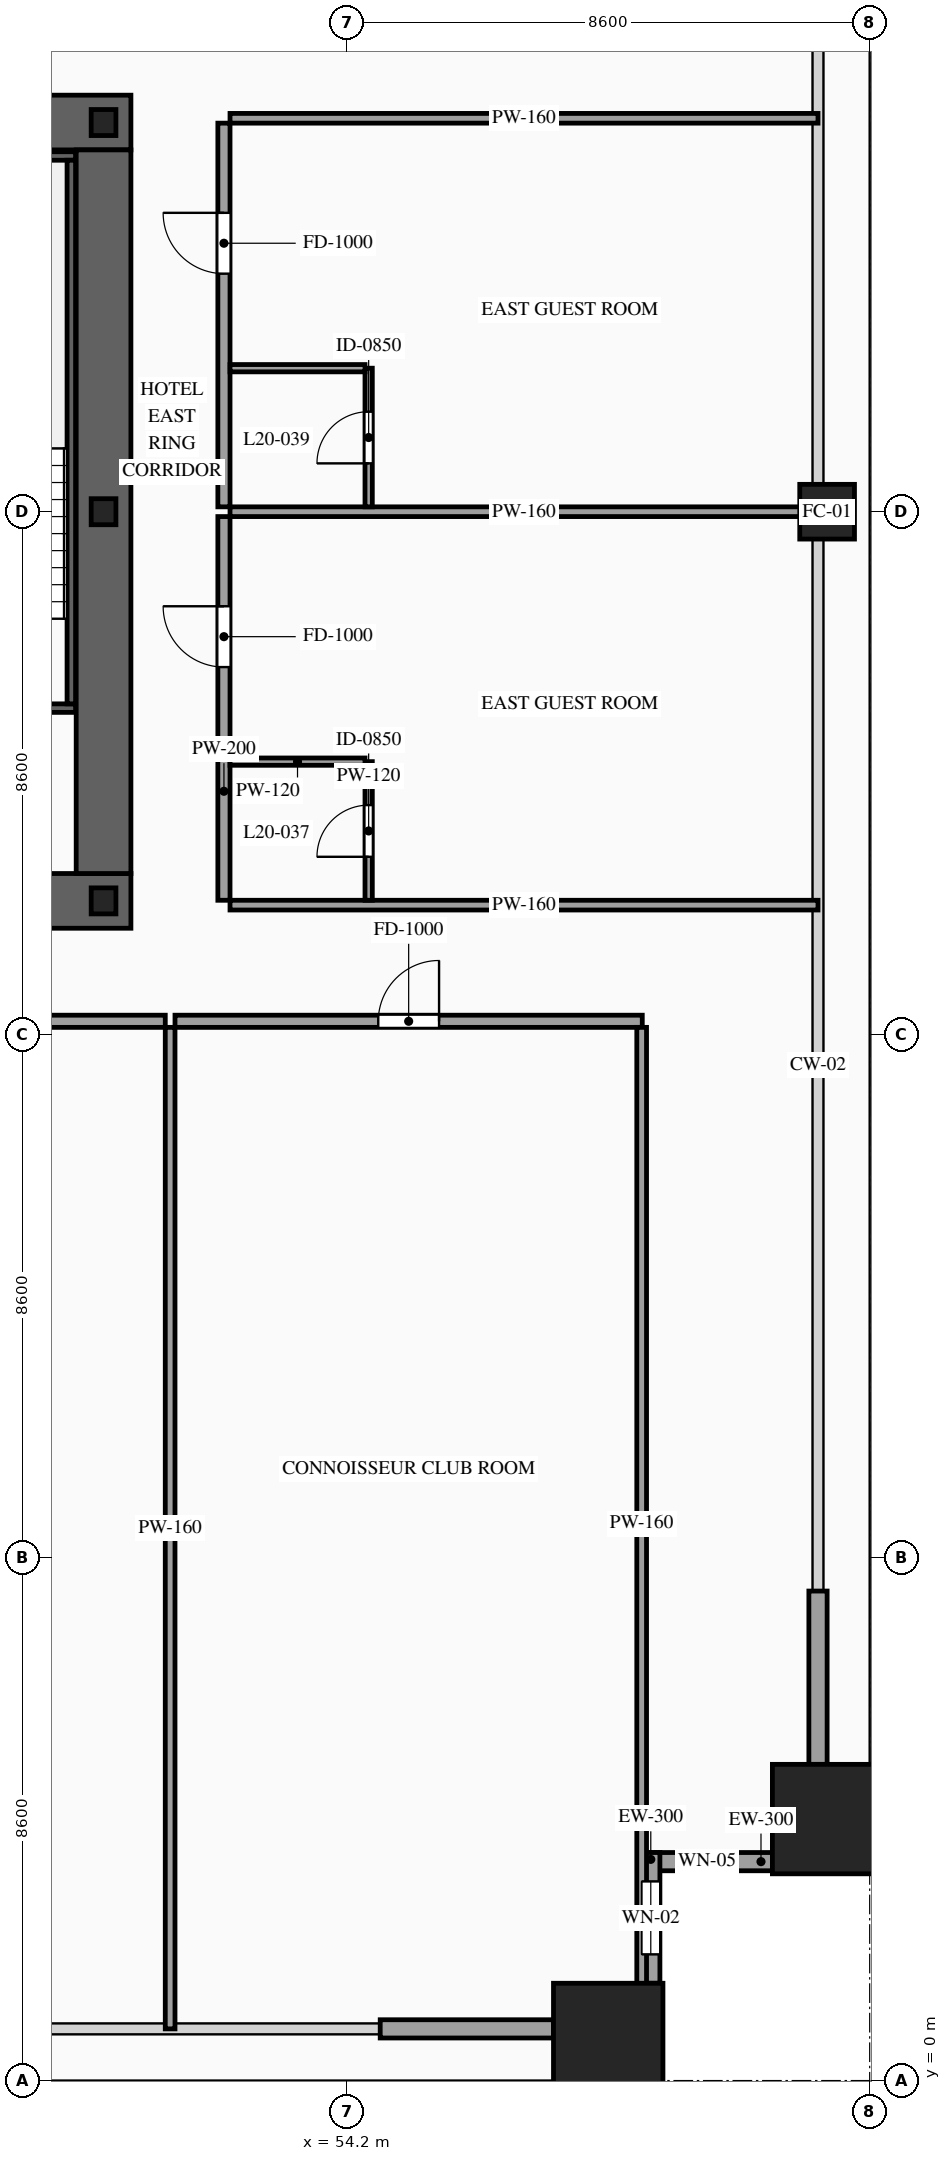
"""IFC4 building model, lengths in metres.
Left out: names, types, materials, properties, quantities, classifications, styles, units other than length and angle.
Written with IfcOpenShell. Run it as: python <this file> out.ifc"""

import sys

from ifc_helpers import new_model, si_unit, direction, frame, frame_2d, origin, origin_2d, place, context, subcontext, project, spatial, rectangle, hollow_rectangle, i_section, extrude, source, transform, mapped, element, fill, save


model = new_model("IFC4")
c1 = context("Model", 3, precision=1e-05, world=origin(), true_north=direction((0.0, 1.0)))
c2 = subcontext(c1, "Body", "Model", "MODEL_VIEW")
j1 = project(units=[si_unit("LENGTHUNIT", "METRE"), si_unit("PLANEANGLEUNIT", "RADIAN")], contexts=[c1])
p1 = place(None, origin())
s1 = spatial("IfcSite", under=j1, at=p1, CompositionType="ELEMENT")
p2 = place(p1, origin())
s2 = spatial("IfcBuilding", under=s1, at=p2, CompositionType="ELEMENT")
p3 = place(p2, frame((0.0, 0.0, 78.4)))
s3 = spatial("IfcBuildingStorey", under=s2, at=p3, CompositionType="ELEMENT", Elevation=78.4)
p4 = place(p3, frame((23.35, 19.4, 0.0), z_axis=(0.0, 0.0, 1.0), x_axis=(1.0, 0.0, 0.0)))
e1 = element("IfcWall", 1, at=p4, inside=s3, PredefinedType="SHEAR", context=c2, shape_type="SweptSolid", body=[
    extrude(rectangle(XDim=27.3, YDim=0.9, at=frame_2d((13.65, 0.0))), origin(), (0.0, 0.0, 1.0), 3.6),
])
p5 = place(p4, frame((2.1, 0.0, 0.0)))
e2 = element("IfcOpeningElement", 2, at=p5, cuts=e1, PredefinedType="OPENING", context=c2, shape_type="SweptSolid", body=[
    extrude(rectangle(XDim=1.1, YDim=2.2, at=frame_2d((0.55, 1.1))), frame((0.0, 0.465, 0.0), z_axis=(0.0, -1.0, 0.0), x_axis=(1.0, 0.0, 0.0)), (0.0, 0.0, 1.0), 0.93),
])
p6 = place(p4, frame((10.0, 0.0, 0.0)))
e3 = element("IfcOpeningElement", 3, at=p6, cuts=e1, PredefinedType="OPENING", context=c2, shape_type="SweptSolid", body=[
    extrude(rectangle(XDim=1.1, YDim=2.2, at=frame_2d((0.55, 1.1))), frame((0.0, 0.465, 0.0), z_axis=(0.0, -1.0, 0.0), x_axis=(1.0, 0.0, 0.0)), (0.0, 0.0, 1.0), 0.93),
])
p7 = place(p4, frame((23.2, 0.0, 0.0)))
e4 = element("IfcOpeningElement", 4, at=p7, cuts=e1, PredefinedType="OPENING", context=c2, shape_type="SweptSolid", body=[
    extrude(rectangle(XDim=1.1, YDim=2.2, at=frame_2d((0.55, 1.1))), frame((0.0, 0.465, 0.0), z_axis=(0.0, -1.0, 0.0), x_axis=(1.0, 0.0, 0.0)), (0.0, 0.0, 1.0), 0.93),
])
p8 = place(p4, frame((19.82, 0.0, 0.0)))
e5 = element("IfcOpeningElement", 5, at=p8, cuts=e1, PredefinedType="OPENING", context=c2, shape_type="SweptSolid", body=[
    extrude(rectangle(XDim=0.9, YDim=2.15, at=frame_2d((0.45, 1.075))), frame((0.0, 0.465, 0.0), z_axis=(0.0, -1.0, 0.0), x_axis=(1.0, 0.0, 0.0)), (0.0, 0.0, 1.0), 0.93),
])
p9 = place(p4, frame((18.38, 0.0, 0.0)))
e6 = element("IfcOpeningElement", 6, at=p9, cuts=e1, PredefinedType="OPENING", context=c2, shape_type="SweptSolid", body=[
    extrude(rectangle(XDim=0.9, YDim=2.15, at=frame_2d((0.45, 1.075))), frame((0.0, 0.465, 0.0), z_axis=(0.0, -1.0, 0.0), x_axis=(1.0, 0.0, 0.0)), (0.0, 0.0, 1.0), 0.93),
])
p10 = place(p3, frame((23.35, 32.2, 0.0), z_axis=(0.0, 0.0, 1.0), x_axis=(1.0, 0.0, 0.0)))
e7 = element("IfcWall", 7, at=p10, inside=s3, PredefinedType="SHEAR", context=c2, shape_type="SweptSolid", body=[
    extrude(rectangle(XDim=27.3, YDim=0.9, at=frame_2d((13.65, 0.0))), origin(), (0.0, 0.0, 1.0), 3.6),
])
p11 = place(p10, frame((4.72, 0.0, 0.0)))
e8 = element("IfcOpeningElement", 8, at=p11, cuts=e7, PredefinedType="OPENING", context=c2, shape_type="SweptSolid", body=[
    extrude(rectangle(XDim=0.9, YDim=2.15, at=frame_2d((0.45, 1.075))), frame((0.0, 0.465, 0.0), z_axis=(0.0, -1.0, 0.0), x_axis=(1.0, 0.0, 0.0)), (0.0, 0.0, 1.0), 0.93),
])
p12 = place(p10, frame((10.0, 0.0, 0.0)))
e9 = element("IfcOpeningElement", 9, at=p12, cuts=e7, PredefinedType="OPENING", context=c2, shape_type="SweptSolid", body=[
    extrude(rectangle(XDim=1.1, YDim=2.2, at=frame_2d((0.55, 1.1))), frame((0.0, 0.465, 0.0), z_axis=(0.0, -1.0, 0.0), x_axis=(1.0, 0.0, 0.0)), (0.0, 0.0, 1.0), 0.93),
])
p13 = place(p10, frame((15.85, 0.0, 0.0)))
e10 = element("IfcOpeningElement", 10, at=p13, cuts=e7, PredefinedType="OPENING", context=c2, shape_type="SweptSolid", body=[
    extrude(rectangle(XDim=1.1, YDim=2.2, at=frame_2d((0.55, 1.1))), frame((0.0, 0.465, 0.0), z_axis=(0.0, -1.0, 0.0), x_axis=(1.0, 0.0, 0.0)), (0.0, 0.0, 1.0), 0.93),
])
m1 = source(origin(), c2, "Body", "SweptSolid", [
    extrude(rectangle(XDim=11.9, YDim=0.9, at=frame_2d((5.95, 0.0))), origin(), (0.0, 0.0, 1.0), 3.6),
])
p14 = place(p3, frame((50.2, 19.85, 0.0), z_axis=(0.0, 0.0, 1.0), x_axis=(0.0, 1.0, 0.0)))
e11 = element("IfcWall", 11, at=p14, inside=s3, PredefinedType="SHEAR", context=c2, shape_type="MappedRepresentation", body=[
    mapped(m1, transform((0.0, 0.0, 0.0), scale=1.0)),
])
m2 = source(origin(), c2, "Body", "SweptSolid", [
    extrude(i_section(OverallWidth=0.407, OverallDepth=0.428, WebThickness=0.02, FlangeThickness=0.035, at=origin_2d()), origin(), (0.0, 0.0, 1.0), 3.6),
])
for number, where, z_axis, x_axis in (
    (12, (50.2, 19.4, 0.0), (0.0, 0.0, 1.0), (1.0, 0.0, 0.0)),
    (13, (50.2, 25.8, 0.0), (0.0, 0.0, 1.0), (1.0, 0.0, 0.0)),
    (14, (50.2, 32.2, 0.0), (0.0, 0.0, 1.0), (1.0, 0.0, 0.0)),
):
    element("IfcColumn", number, at=place(p3, frame(where, z_axis=z_axis, x_axis=x_axis)), inside=s3, PredefinedType="COLUMN", context=c2, shape_type="MappedRepresentation", body=[
        mapped(m2, transform((0.0, 0.0, 0.0), scale=1.0)),
    ])
m3 = source(origin(), c2, "Body", "SweptSolid", [
    extrude(hollow_rectangle(XDim=1.8, YDim=1.8, WallThickness=0.08, at=origin_2d()), origin(), (0.0, 0.0, 1.0), 3.6),
])
for number, where, z_axis, x_axis in (
    (15, (58.5, 0.7, 0.0), (0.0, 0.0, 1.0), (1.0, 0.0, 0.0)),
    (16, (62.1, 4.3, 0.0), (0.0, 0.0, 1.0), (1.0, 0.0, 0.0)),
):
    element("IfcColumn", number, at=place(p3, frame(where, z_axis=z_axis, x_axis=x_axis)), inside=s3, PredefinedType="COLUMN", context=c2, shape_type="MappedRepresentation", body=[
        mapped(m3, transform((0.0, 0.0, 0.0), scale=1.0)),
    ])
m4 = source(origin(), c2, "Body", "SweptSolid", [
    extrude(hollow_rectangle(XDim=0.9, YDim=0.9, WallThickness=0.042, at=origin_2d()), origin(), (0.0, 0.0, 1.0), 3.6),
])
p15 = place(p3, frame((62.1, 25.8, 0.0), z_axis=(0.0, 0.0, 1.0), x_axis=(1.0, 0.0, 0.0)))
e17 = element("IfcColumn", 17, at=p15, inside=s3, PredefinedType="COLUMN", context=c2, shape_type="MappedRepresentation", body=[
    mapped(m4, transform((0.0, 0.0, 0.0), scale=1.0)),
])
p16 = place(p3, frame((59.05, 3.6, 0.0), z_axis=(0.0, 0.0, 1.0), x_axis=(1.0, 0.0, 0.0)))
e18 = element("IfcWall", 18, at=p16, inside=s3, PredefinedType="SOLIDWALL", context=c2, shape_type="SweptSolid", body=[
    extrude(rectangle(XDim=2.15, YDim=0.3, at=frame_2d((1.075, 0.0))), origin(), (0.0, 0.0, 1.0), 3.38),
])
p17 = place(p16, frame((0.625, 0.0, 0.85)))
e19 = element("IfcOpeningElement", 19, at=p17, cuts=e18, PredefinedType="OPENING", context=c2, shape_type="SweptSolid", body=[
    extrude(rectangle(XDim=0.9, YDim=1.5, at=frame_2d((0.45, 0.75))), frame((0.0, 0.165, 0.0), z_axis=(0.0, -1.0, 0.0), x_axis=(1.0, 0.0, 0.0)), (0.0, 0.0, 1.0), 0.33),
])
p18 = place(p3, frame((59.2, 1.6, 0.0), z_axis=(0.0, 0.0, 1.0), x_axis=(0.0, 1.0, 0.0)))
e20 = element("IfcWall", 20, at=p18, inside=s3, PredefinedType="SOLIDWALL", context=c2, shape_type="SweptSolid", body=[
    extrude(rectangle(XDim=2.15, YDim=0.3, at=frame_2d((1.075, 0.0))), origin(), (0.0, 0.0, 1.0), 3.38),
])
p19 = place(p18, frame((0.475, 0.0, 0.85)))
e21 = element("IfcOpeningElement", 21, at=p19, cuts=e20, PredefinedType="OPENING", context=c2, shape_type="SweptSolid", body=[
    extrude(rectangle(XDim=1.2, YDim=2.1, at=frame_2d((0.6, 1.05))), frame((0.0, 0.165, 0.0), z_axis=(0.0, -1.0, 0.0), x_axis=(1.0, 0.0, 0.0)), (0.0, 0.0, 1.0), 0.33),
])
m5 = source(origin(), c2, "Body", "SweptSolid", [
    extrude(rectangle(XDim=2.85, YDim=0.3, at=frame_2d((1.425, 0.0))), origin(), (0.0, 0.0, 1.0), 2.775),
])
for number, where, z_axis, x_axis in (
    (22, (54.75, 0.85, 0.0), (0.0, 0.0, 1.0), (1.0, 0.0, 0.0)),
    (23, (61.95, 5.2, 0.0), (0.0, 0.0, 1.0), (0.0, 1.0, 0.0)),
):
    element("IfcWall", number, at=place(p3, frame(where, z_axis=z_axis, x_axis=x_axis)), inside=s3, PredefinedType="SOLIDWALL", context=c2, shape_type="MappedRepresentation", body=[
        mapped(m5, transform((0.0, 0.0, 0.0), scale=1.0)),
    ])
p20 = place(p3, frame((46.46, 22.57, 0.0), z_axis=(0.0, 0.0, 1.0), x_axis=(1.0, 0.0, 0.0)))
e24 = element("IfcWall", 24, at=p20, inside=s3, PredefinedType="SOLIDWALL", context=c2, shape_type="SweptSolid", body=[
    extrude(rectangle(XDim=3.28, YDim=0.14, at=frame_2d((1.64, 0.0))), origin(), (0.0, 0.0, 1.0), 3.38),
])
p21 = place(p20, frame((1.09, 0.0, 0.0)))
e25 = element("IfcOpeningElement", 25, at=p21, cuts=e24, PredefinedType="OPENING", context=c2, shape_type="SweptSolid", body=[
    extrude(rectangle(XDim=1.1, YDim=2.2, at=frame_2d((0.55, 1.1))), frame((0.0, 0.085, 0.0), z_axis=(0.0, -1.0, 0.0), x_axis=(1.0, 0.0, 0.0)), (0.0, 0.0, 1.0), 0.17),
])
m6 = source(origin(), c2, "Body", "SweptSolid", [
    extrude(rectangle(XDim=3.28, YDim=0.14, at=frame_2d((1.64, 0.0))), origin(), (0.0, 0.0, 1.0), 3.38),
])
p22 = place(p3, frame((46.46, 31.65, 0.0), z_axis=(0.0, 0.0, 1.0), x_axis=(1.0, 0.0, 0.0)))
e26 = element("IfcWall", 26, at=p22, inside=s3, PredefinedType="SOLIDWALL", context=c2, shape_type="MappedRepresentation", body=[
    mapped(m6, transform((0.0, 0.0, 0.0), scale=1.0)),
])
m7 = source(origin(), c2, "Body", "SweptSolid", [
    extrude(rectangle(XDim=8.94, YDim=0.14, at=frame_2d((4.47, 0.0))), origin(), (0.0, 0.0, 1.0), 3.38),
])
p23 = place(p3, frame((49.67, 22.64, 0.0), z_axis=(0.0, 0.0, 1.0), x_axis=(0.0, 1.0, 0.0)))
e27 = element("IfcWall", 27, at=p23, inside=s3, PredefinedType="SOLIDWALL", context=c2, shape_type="MappedRepresentation", body=[
    mapped(m7, transform((0.0, 0.0, 0.0), scale=1.0)),
])
p24 = place(p3, frame((39.727, 17.42, 0.0), z_axis=(0.0, 0.0, 1.0), x_axis=(1.0, 0.0, 0.0)))
e28 = element("IfcWall", 28, at=p24, inside=s3, PredefinedType="PARTITIONING", context=c2, shape_type="SweptSolid", body=[
    extrude(rectangle(XDim=11.488, YDim=0.2, at=frame_2d((5.744, 0.0))), origin(), (0.0, 0.0, 1.0), 3.38),
])
p25 = place(p24, frame((6.449, 0.0, 0.0)))
e29 = element("IfcOpeningElement", 29, at=p25, cuts=e28, PredefinedType="OPENING", context=c2, shape_type="SweptSolid", body=[
    extrude(rectangle(XDim=1.0, YDim=2.2, at=frame_2d((0.5, 1.1))), frame((0.0, 0.115, 0.0), z_axis=(0.0, -1.0, 0.0), x_axis=(1.0, 0.0, 0.0)), (0.0, 0.0, 1.0), 0.23),
])
m8 = source(origin(), c2, "Body", "SweptSolid", [
    extrude(rectangle(XDim=16.47, YDim=0.16, at=frame_2d((8.235, 0.0))), origin(), (0.0, 0.0, 1.0), 3.38),
])
p26 = place(p3, frame((51.295, 0.85, 0.0), z_axis=(0.0, 0.0, 1.0), x_axis=(0.0, 1.0, 0.0)))
e30 = element("IfcWall", 30, at=p26, inside=s3, PredefinedType="PARTITIONING", context=c2, shape_type="MappedRepresentation", body=[
    mapped(m8, transform((0.0, 0.0, 0.0), scale=1.0)),
])
p27 = place(p3, frame((51.375, 17.42, 0.0), z_axis=(0.0, 0.0, 1.0), x_axis=(1.0, 0.0, 0.0)))
e31 = element("IfcWall", 31, at=p27, inside=s3, PredefinedType="PARTITIONING", context=c2, shape_type="SweptSolid", body=[
    extrude(rectangle(XDim=7.685, YDim=0.2, at=frame_2d((3.843, 0.0))), origin(), (0.0, 0.0, 1.0), 3.38),
])
p28 = place(p27, frame((3.343, 0.0, 0.0)))
e32 = element("IfcOpeningElement", 32, at=p28, cuts=e31, PredefinedType="OPENING", context=c2, shape_type="SweptSolid", body=[
    extrude(rectangle(XDim=1.0, YDim=2.2, at=frame_2d((0.5, 1.1))), frame((0.0, 0.115, 0.0), z_axis=(0.0, -1.0, 0.0), x_axis=(1.0, 0.0, 0.0)), (0.0, 0.0, 1.0), 0.23),
])
m9 = source(origin(), c2, "Body", "SweptSolid", [
    extrude(rectangle(XDim=16.32, YDim=0.16, at=frame_2d((8.16, 0.0))), origin(), (0.0, 0.0, 1.0), 3.38),
])
p29 = place(p3, frame((59.05, 1.0, 0.0), z_axis=(0.0, 0.0, 1.0), x_axis=(0.0, 1.0, 0.0)))
e33 = element("IfcWall", 33, at=p29, inside=s3, PredefinedType="PARTITIONING", context=c2, shape_type="MappedRepresentation", body=[
    mapped(m9, transform((0.0, 0.0, 0.0), scale=1.0)),
])
p30 = place(p3, frame((52.18, 19.41, 0.0), z_axis=(0.0, 0.0, 1.0), x_axis=(0.0, 1.0, 0.0)))
e34 = element("IfcWall", 34, at=p30, inside=s3, PredefinedType="PARTITIONING", context=c2, shape_type="SweptSolid", body=[
    extrude(rectangle(XDim=6.31, YDim=0.2, at=frame_2d((3.155, 0.0))), origin(), (0.0, 0.0, 1.0), 3.38),
])
p31 = place(p30, frame((3.835, 0.0, 0.0)))
e35 = element("IfcOpeningElement", 35, at=p31, cuts=e34, PredefinedType="OPENING", context=c2, shape_type="SweptSolid", body=[
    extrude(rectangle(XDim=1.0, YDim=2.2, at=frame_2d((0.5, 1.1))), frame((0.0, 0.115, 0.0), z_axis=(0.0, -1.0, 0.0), x_axis=(1.0, 0.0, 0.0)), (0.0, 0.0, 1.0), 0.23),
])
m10 = source(origin(), c2, "Body", "SweptSolid", [
    extrude(rectangle(XDim=9.67, YDim=0.16, at=frame_2d((4.835, 0.0))), origin(), (0.0, 0.0, 1.0), 2.575),
])
p32 = place(p3, frame((52.28, 25.8, 0.0), z_axis=(0.0, 0.0, 1.0), x_axis=(1.0, 0.0, 0.0)))
e36 = element("IfcWall", 36, at=p32, inside=s3, PredefinedType="PARTITIONING", context=c2, shape_type="MappedRepresentation", body=[
    mapped(m10, transform((0.0, 0.0, 0.0), scale=1.0)),
])
m11 = source(origin(), c2, "Body", "SweptSolid", [
    extrude(rectangle(XDim=9.67, YDim=0.16, at=frame_2d((4.835, 0.0))), origin(), (0.0, 0.0, 1.0), 2.875),
])
p33 = place(p3, frame((52.28, 19.33, 0.0), z_axis=(0.0, 0.0, 1.0), x_axis=(1.0, 0.0, 0.0)))
e37 = element("IfcWall", 37, at=p33, inside=s3, PredefinedType="PARTITIONING", context=c2, shape_type="MappedRepresentation", body=[
    mapped(m11, transform((0.0, 0.0, 0.0), scale=1.0)),
])
p34 = place(p3, frame((54.56, 19.41, 0.0), z_axis=(0.0, 0.0, 1.0), x_axis=(0.0, 1.0, 0.0)))
e38 = element("IfcWall", 38, at=p34, inside=s3, PredefinedType="PARTITIONING", context=c2, shape_type="SweptSolid", body=[
    extrude(rectangle(XDim=2.28, YDim=0.12, at=frame_2d((1.14, 0.0))), origin(), (0.0, 0.0, 1.0), 3.38),
])
p35 = place(p34, frame((0.715, 0.0, 0.0)))
e39 = element("IfcOpeningElement", 39, at=p35, cuts=e38, PredefinedType="OPENING", context=c2, shape_type="SweptSolid", body=[
    extrude(rectangle(XDim=0.85, YDim=2.1, at=frame_2d((0.425, 1.05))), frame((0.0, 0.075, 0.0), z_axis=(0.0, -1.0, 0.0), x_axis=(1.0, 0.0, 0.0)), (0.0, 0.0, 1.0), 0.15),
])
m12 = source(origin(), c2, "Body", "SweptSolid", [
    extrude(rectangle(XDim=2.22, YDim=0.12, at=frame_2d((1.11, 0.0))), origin(), (0.0, 0.0, 1.0), 3.38),
])
p36 = place(p3, frame((52.28, 21.69, 0.0), z_axis=(0.0, 0.0, 1.0), x_axis=(1.0, 0.0, 0.0)))
e40 = element("IfcWall", 40, at=p36, inside=s3, PredefinedType="PARTITIONING", context=c2, shape_type="MappedRepresentation", body=[
    mapped(m12, transform((0.0, 0.0, 0.0), scale=1.0)),
])
p37 = place(p3, frame((52.18, 25.88, 0.0), z_axis=(0.0, 0.0, 1.0), x_axis=(0.0, 1.0, 0.0)))
e41 = element("IfcWall", 41, at=p37, inside=s3, PredefinedType="PARTITIONING", context=c2, shape_type="SweptSolid", body=[
    extrude(rectangle(XDim=6.31, YDim=0.2, at=frame_2d((3.155, 0.0))), origin(), (0.0, 0.0, 1.0), 3.38),
])
p38 = place(p37, frame((3.835, 0.0, 0.0)))
e42 = element("IfcOpeningElement", 42, at=p38, cuts=e41, PredefinedType="OPENING", context=c2, shape_type="SweptSolid", body=[
    extrude(rectangle(XDim=1.0, YDim=2.2, at=frame_2d((0.5, 1.1))), frame((0.0, 0.115, 0.0), z_axis=(0.0, -1.0, 0.0), x_axis=(1.0, 0.0, 0.0)), (0.0, 0.0, 1.0), 0.23),
])
p39 = place(p3, frame((52.28, 32.27, 0.0), z_axis=(0.0, 0.0, 1.0), x_axis=(1.0, 0.0, 0.0)))
e43 = element("IfcWall", 43, at=p39, inside=s3, PredefinedType="PARTITIONING", context=c2, shape_type="MappedRepresentation", body=[
    mapped(m11, transform((0.0, 0.0, 0.0), scale=1.0)),
])
p40 = place(p3, frame((54.56, 25.88, 0.0), z_axis=(0.0, 0.0, 1.0), x_axis=(0.0, 1.0, 0.0)))
e44 = element("IfcWall", 44, at=p40, inside=s3, PredefinedType="PARTITIONING", context=c2, shape_type="SweptSolid", body=[
    extrude(rectangle(XDim=2.28, YDim=0.12, at=frame_2d((1.14, 0.0))), origin(), (0.0, 0.0, 1.0), 3.38),
])
p41 = place(p40, frame((0.715, 0.0, 0.0)))
e45 = element("IfcOpeningElement", 45, at=p41, cuts=e44, PredefinedType="OPENING", context=c2, shape_type="SweptSolid", body=[
    extrude(rectangle(XDim=0.85, YDim=2.1, at=frame_2d((0.425, 1.05))), frame((0.0, 0.075, 0.0), z_axis=(0.0, -1.0, 0.0), x_axis=(1.0, 0.0, 0.0)), (0.0, 0.0, 1.0), 0.15),
])
p42 = place(p3, frame((52.28, 28.16, 0.0), z_axis=(0.0, 0.0, 1.0), x_axis=(1.0, 0.0, 0.0)))
e46 = element("IfcWall", 46, at=p42, inside=s3, PredefinedType="PARTITIONING", context=c2, shape_type="MappedRepresentation", body=[
    mapped(m12, transform((0.0, 0.0, 0.0), scale=1.0)),
])
m13 = source(origin(), c2, "Body", "SweptSolid", [
    extrude(rectangle(XDim=0.9, YDim=1.5, at=frame_2d((0.45, 0.75))), frame((0.0, 0.03, 0.0), z_axis=(0.0, -1.0, 0.0), x_axis=(1.0, 0.0, 0.0)), (0.0, 0.0, 1.0), 0.06),
])
p43 = place(p17, origin())
e47 = element("IfcWindow", 47, at=p43, inside=s3, PartitioningType="SINGLE_PANEL", PredefinedType="WINDOW", context=c2, shape_type="MappedRepresentation", body=[
    mapped(m13, transform((0.0, 0.0, 0.0), scale=1.0)),
])
fill(e19, e47)
m14 = source(origin(), c2, "Body", "SweptSolid", [
    extrude(rectangle(XDim=1.2, YDim=2.1, at=frame_2d((0.6, 1.05))), frame((0.0, 0.03, 0.0), z_axis=(0.0, -1.0, 0.0), x_axis=(1.0, 0.0, 0.0)), (0.0, 0.0, 1.0), 0.06),
])
p44 = place(p19, origin())
e48 = element("IfcWindow", 48, at=p44, inside=s3, PartitioningType="SINGLE_PANEL", PredefinedType="WINDOW", context=c2, shape_type="MappedRepresentation", body=[
    mapped(m14, transform((0.0, 0.0, 0.0), scale=1.0)),
])
fill(e21, e48)
m15 = source(origin(), c2, "Body", "SweptSolid", [
    extrude(rectangle(XDim=1.0, YDim=2.2, at=frame_2d((0.5, 1.1))), frame((0.0, 0.025, 0.0), z_axis=(0.0, -1.0, 0.0), x_axis=(1.0, 0.0, 0.0)), (0.0, 0.0, 1.0), 0.05),
])
p45 = place(p28, origin())
e49 = element("IfcDoor", 49, at=p45, inside=s3, OperationType="SINGLE_SWING_RIGHT", PredefinedType="DOOR", context=c2, shape_type="MappedRepresentation", body=[
    mapped(m15, transform((0.0, 0.0, 0.0), scale=1.0)),
])
fill(e32, e49)
p46 = place(p31, origin())
e50 = element("IfcDoor", 50, at=p46, inside=s3, OperationType="SINGLE_SWING_RIGHT", PredefinedType="DOOR", context=c2, shape_type="MappedRepresentation", body=[
    mapped(m15, transform((0.0, 0.0, 0.0), scale=1.0)),
])
fill(e35, e50)
m16 = source(origin(), c2, "Body", "SweptSolid", [
    extrude(rectangle(XDim=0.85, YDim=2.1, at=frame_2d((0.425, 1.05))), frame((0.0, 0.025, 0.0), z_axis=(0.0, -1.0, 0.0), x_axis=(1.0, 0.0, 0.0)), (0.0, 0.0, 1.0), 0.05),
])
p47 = place(p35, origin())
e51 = element("IfcDoor", 51, at=p47, inside=s3, OperationType="SINGLE_SWING_LEFT", PredefinedType="DOOR", context=c2, shape_type="MappedRepresentation", body=[
    mapped(m16, transform((0.0, 0.0, 0.0), scale=1.0)),
])
fill(e39, e51)
p48 = place(p38, origin())
e52 = element("IfcDoor", 52, at=p48, inside=s3, OperationType="SINGLE_SWING_RIGHT", PredefinedType="DOOR", context=c2, shape_type="MappedRepresentation", body=[
    mapped(m15, transform((0.0, 0.0, 0.0), scale=1.0)),
])
fill(e42, e52)
p49 = place(p41, origin())
e53 = element("IfcDoor", 53, at=p49, inside=s3, OperationType="SINGLE_SWING_LEFT", PredefinedType="DOOR", context=c2, shape_type="MappedRepresentation", body=[
    mapped(m16, transform((0.0, 0.0, 0.0), scale=1.0)),
])
fill(e45, e53)
save(model, sys.argv[1])
